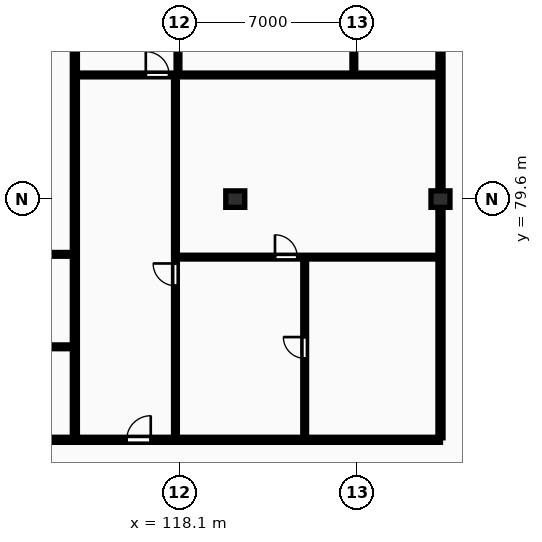
"""IFC4 building model, lengths in metres.
Left out: names, types, materials, properties, quantities, classifications, styles, units other than length and angle.
Written with IfcOpenShell. Run it as: python <this file> out.ifc"""

import sys

from ifc_helpers import new_model, si_unit, direction, frame, frame_2d, origin, origin_2d, place, context, subcontext, project, spatial, rectangle, extrude, element, fill, save


model = new_model("IFC4")
c1 = context("Model", 3, precision=1e-05, world=origin(), true_north=direction((0.0, 1.0)))
c2 = subcontext(c1, "Body", "Model", "MODEL_VIEW")
j1 = project(units=[si_unit("LENGTHUNIT", "METRE"), si_unit("PLANEANGLEUNIT", "RADIAN")], contexts=[c1])
p1 = place(None, origin())
s1 = spatial("IfcSite", under=j1, at=p1, CompositionType="ELEMENT")
p2 = place(p1, origin())
s2 = spatial("IfcBuilding", under=s1, at=p2, CompositionType="ELEMENT")
p3 = place(p2, frame((0.0, 0.0, 242.45)))
s3 = spatial("IfcBuildingStorey", under=s2, at=p3, CompositionType="ELEMENT", Elevation=242.45)
for number, where, z_axis, x_axis in (
    (1, (120.3, 79.6, 0.0), (0.0, 0.0, 1.0), (1.0, 0.0, 0.0)),
    (2, (128.4, 79.6, 0.0), (0.0, 0.0, 1.0), (1.0, 0.0, 0.0)),
):
    element("IfcColumn", number, at=place(p3, frame(where, z_axis=z_axis, x_axis=x_axis)), inside=s3, PredefinedType="COLUMN", context=c2, shape_type="SweptSolid", body=[
        extrude(rectangle(XDim=0.75, YDim=0.65, at=origin_2d()), origin(), (0.0, 0.0, 1.0), 3.45),
    ])
p4 = place(p3, frame((128.4, 70.18, 0.0), z_axis=(0.0, 0.0, 1.0), x_axis=(0.0, 1.0, 0.0)))
e3 = element("IfcWall", 3, at=p4, inside=s3, PredefinedType="PARTITIONING", context=c2, shape_type="SweptSolid", body=[
    extrude(rectangle(XDim=24.32, YDim=0.2, at=frame_2d((12.16, 0.0))), origin(), (0.0, 0.0, 1.0), 2.477),
])
p5 = place(p3, frame((113.969, 70.18, 0.0), z_axis=(0.0, 0.0, 1.0), x_axis=(0.0, 1.0, 0.0)))
e4 = element("IfcWall", 4, at=p5, inside=s3, PredefinedType="PARTITIONING", context=c2, shape_type="SweptSolid", body=[
    extrude(rectangle(XDim=24.32, YDim=0.2, at=frame_2d((12.16, 0.0))), origin(), (0.0, 0.0, 1.0), 3.17),
])
for number, where, z_axis, x_axis in (
    (5, (110.529, 73.77, 0.0), (0.0, 0.0, 1.0), (1.0, 0.0, 0.0)),
    (6, (110.529, 77.42, 0.0), (0.0, 0.0, 1.0), (1.0, 0.0, 0.0)),
):
    element("IfcWall", number, at=place(p3, frame(where, z_axis=z_axis, x_axis=x_axis)), inside=s3, PredefinedType="PARTITIONING", context=c2, shape_type="SweptSolid", body=[
        extrude(rectangle(XDim=3.36, YDim=0.15, at=frame_2d((1.68, 0.0))), origin(), (0.0, 0.0, 1.0), 3.17),
    ])
p6 = place(p3, frame((123.039, 70.16, 0.0), z_axis=(0.0, 0.0, 1.0), x_axis=(0.0, 1.0, 0.0)))
e7 = element("IfcWall", 7, at=p6, inside=s3, PredefinedType="PARTITIONING", context=c2, shape_type="SweptSolid", body=[
    extrude(rectangle(XDim=7.15, YDim=0.15, at=frame_2d((3.575, 0.0))), origin(), (0.0, 0.0, 1.0), 3.17),
])
p7 = place(p6, frame((3.155, 0.0, 0.0)))
e8 = element("IfcOpeningElement", 8, at=p7, cuts=e7, PredefinedType="OPENING", context=c2, shape_type="SweptSolid", body=[
    extrude(rectangle(XDim=0.84, YDim=2.04, at=frame_2d((0.42, 1.02))), frame((0.0, 0.085, 0.0), z_axis=(0.0, -1.0, 0.0), x_axis=(1.0, 0.0, 0.0)), (0.0, 0.0, 1.0), 0.17),
])
p8 = place(p3, frame((117.999, 77.31, 0.0), z_axis=(0.0, 0.0, 1.0), x_axis=(1.0, 0.0, 0.0)))
e9 = element("IfcWall", 9, at=p8, inside=s3, PredefinedType="PARTITIONING", context=c2, shape_type="SweptSolid", body=[
    extrude(rectangle(XDim=10.321, YDim=0.15, at=frame_2d((5.161, 0.0))), origin(), (0.0, 0.0, 1.0), 3.17),
])
p9 = place(p8, frame((3.869, 0.0, 0.0)))
e10 = element("IfcOpeningElement", 10, at=p9, cuts=e9, PredefinedType="OPENING", context=c2, shape_type="SweptSolid", body=[
    extrude(rectangle(XDim=0.88, YDim=2.06, at=frame_2d((0.44, 1.03))), frame((0.0, 0.085, 0.0), z_axis=(0.0, -1.0, 0.0), x_axis=(1.0, 0.0, 0.0)), (0.0, 0.0, 1.0), 0.17),
])
p10 = place(p3, frame((117.939, 70.16, 0.0), z_axis=(0.0, 0.0, 1.0), x_axis=(0.0, 1.0, 0.0)))
e11 = element("IfcWall", 11, at=p10, inside=s3, PredefinedType="PARTITIONING", context=c2, shape_type="SweptSolid", body=[
    extrude(rectangle(XDim=14.3, YDim=0.15, at=frame_2d((7.15, 0.0))), origin(), (0.0, 0.0, 1.0), 3.17),
])
p11 = place(p10, frame((6.02, 0.0, 0.0)))
e12 = element("IfcOpeningElement", 12, at=p11, cuts=e11, PredefinedType="OPENING", context=c2, shape_type="SweptSolid", body=[
    extrude(rectangle(XDim=0.88, YDim=2.06, at=frame_2d((0.44, 1.03))), frame((0.0, 0.085, 0.0), z_axis=(0.0, -1.0, 0.0), x_axis=(1.0, 0.0, 0.0)), (0.0, 0.0, 1.0), 0.17),
])
p12 = place(p3, frame((118.039, 84.54, 0.0), z_axis=(0.0, 0.0, 1.0), x_axis=(0.0, 1.0, 0.0)))
e13 = element("IfcWall", 13, at=p12, inside=s3, PredefinedType="PARTITIONING", context=c2, shape_type="SweptSolid", body=[
    extrude(rectangle(XDim=5.0, YDim=0.15, at=frame_2d((2.5, 0.0))), origin(), (0.0, 0.0, 1.0), 3.17),
])
p13 = place(p12, frame((2.06, 0.0, 0.0)))
e14 = element("IfcOpeningElement", 14, at=p13, cuts=e13, PredefinedType="OPENING", context=c2, shape_type="SweptSolid", body=[
    extrude(rectangle(XDim=0.88, YDim=2.06, at=frame_2d((0.44, 1.03))), frame((0.0, 0.085, 0.0), z_axis=(0.0, -1.0, 0.0), x_axis=(1.0, 0.0, 0.0)), (0.0, 0.0, 1.0), 0.17),
])
p14 = place(p3, frame((124.98, 84.54, 0.0), z_axis=(0.0, 0.0, 1.0), x_axis=(0.0, 1.0, 0.0)))
e15 = element("IfcWall", 15, at=p14, inside=s3, PredefinedType="PARTITIONING", context=c2, shape_type="SweptSolid", body=[
    extrude(rectangle(XDim=9.96, YDim=0.15, at=frame_2d((4.98, 0.0))), origin(), (0.0, 0.0, 1.0), 3.17),
])
p15 = place(p14, frame((1.43, 0.0, 0.0)))
e16 = element("IfcOpeningElement", 16, at=p15, cuts=e15, PredefinedType="OPENING", context=c2, shape_type="SweptSolid", body=[
    extrude(rectangle(XDim=0.84, YDim=2.04, at=frame_2d((0.42, 1.02))), frame((0.0, 0.085, 0.0), z_axis=(0.0, -1.0, 0.0), x_axis=(1.0, 0.0, 0.0)), (0.0, 0.0, 1.0), 0.17),
])
p16 = place(p14, frame((3.92, 0.0, 0.0)))
e17 = element("IfcOpeningElement", 17, at=p16, cuts=e15, PredefinedType="OPENING", context=c2, shape_type="SweptSolid", body=[
    extrude(rectangle(XDim=0.84, YDim=2.04, at=frame_2d((0.42, 1.02))), frame((0.0, 0.085, 0.0), z_axis=(0.0, -1.0, 0.0), x_axis=(1.0, 0.0, 0.0)), (0.0, 0.0, 1.0), 0.17),
])
p17 = place(p14, frame((5.48, 0.0, 0.0)))
e18 = element("IfcOpeningElement", 18, at=p17, cuts=e15, PredefinedType="OPENING", context=c2, shape_type="SweptSolid", body=[
    extrude(rectangle(XDim=0.88, YDim=2.06, at=frame_2d((0.44, 1.03))), frame((0.0, 0.085, 0.0), z_axis=(0.0, -1.0, 0.0), x_axis=(1.0, 0.0, 0.0)), (0.0, 0.0, 1.0), 0.17),
])
p18 = place(p3, frame((114.049, 84.5, 0.0), z_axis=(0.0, 0.0, 1.0), x_axis=(1.0, 0.0, 0.0)))
e19 = element("IfcWall", 19, at=p18, inside=s3, PredefinedType="PARTITIONING", context=c2, shape_type="SweptSolid", body=[
    extrude(rectangle(XDim=14.271, YDim=0.15, at=frame_2d((7.136, 0.0))), origin(), (0.0, 0.0, 1.0), 3.17),
])
p19 = place(p18, frame((2.72, 0.0, 0.0)))
e20 = element("IfcOpeningElement", 20, at=p19, cuts=e19, PredefinedType="OPENING", context=c2, shape_type="SweptSolid", body=[
    extrude(rectangle(XDim=0.92, YDim=2.08, at=frame_2d((0.46, 1.04))), frame((0.0, 0.085, 0.0), z_axis=(0.0, -1.0, 0.0), x_axis=(1.0, 0.0, 0.0)), (0.0, 0.0, 1.0), 0.17),
])
p20 = place(p3, frame((59.8, 70.1, 0.0), z_axis=(0.0, 0.0, 1.0), x_axis=(1.0, 0.0, 0.0)))
e21 = element("IfcWall", 21, at=p20, inside=s3, PredefinedType="PARTITIONING", context=c2, shape_type="SweptSolid", body=[
    extrude(rectangle(XDim=68.6, YDim=0.2, at=frame_2d((34.3, 0.0))), origin(), (0.0, 0.0, 1.0), 3.17),
])
p21 = place(p20, frame((2.045, 0.0, 0.0)))
e22 = element("IfcOpeningElement", 22, at=p21, cuts=e21, PredefinedType="OPENING", context=c2, shape_type="SweptSolid", body=[
    extrude(rectangle(XDim=0.95, YDim=2.15, at=frame_2d((0.475, 1.075))), frame((0.0, 0.11, 0.0), z_axis=(0.0, -1.0, 0.0), x_axis=(1.0, 0.0, 0.0)), (0.0, 0.0, 1.0), 0.22),
])
p22 = place(p20, frame((24.57, 0.0, 0.0)))
e23 = element("IfcOpeningElement", 23, at=p22, cuts=e21, PredefinedType="OPENING", context=c2, shape_type="SweptSolid", body=[
    extrude(rectangle(XDim=1.22, YDim=2.18, at=frame_2d((0.61, 1.09))), frame((0.0, 0.11, 0.0), z_axis=(0.0, -1.0, 0.0), x_axis=(1.0, 0.0, 0.0)), (0.0, 0.0, 1.0), 0.22),
])
p23 = place(p20, frame((43.507, 0.0, 0.0)))
e24 = element("IfcOpeningElement", 24, at=p23, cuts=e21, PredefinedType="OPENING", context=c2, shape_type="SweptSolid", body=[
    extrude(rectangle(XDim=1.22, YDim=2.18, at=frame_2d((0.61, 1.09))), frame((0.0, 0.11, 0.0), z_axis=(0.0, -1.0, 0.0), x_axis=(1.0, 0.0, 0.0)), (0.0, 0.0, 1.0), 0.22),
])
p24 = place(p20, frame((56.214, 0.0, 0.0)))
e25 = element("IfcOpeningElement", 25, at=p24, cuts=e21, PredefinedType="OPENING", context=c2, shape_type="SweptSolid", body=[
    extrude(rectangle(XDim=0.95, YDim=2.15, at=frame_2d((0.475, 1.075))), frame((0.0, 0.11, 0.0), z_axis=(0.0, -1.0, 0.0), x_axis=(1.0, 0.0, 0.0)), (0.0, 0.0, 1.0), 0.22),
])
p25 = place(p7, origin())
e26 = element("IfcDoor", 26, at=p25, inside=s3, OperationType="SINGLE_SWING_RIGHT", PredefinedType="DOOR", context=c2, shape_type="SweptSolid", body=[
    extrude(rectangle(XDim=0.84, YDim=2.04, at=frame_2d((0.42, 1.02))), frame((0.0, 0.025, 0.0), z_axis=(0.0, -1.0, 0.0), x_axis=(1.0, 0.0, 0.0)), (0.0, 0.0, 1.0), 0.05),
])
fill(e8, e26)
p26 = place(p9, origin())
e27 = element("IfcDoor", 27, at=p26, inside=s3, OperationType="SINGLE_SWING_LEFT", PredefinedType="DOOR", context=c2, shape_type="SweptSolid", body=[
    extrude(rectangle(XDim=0.88, YDim=2.06, at=frame_2d((0.44, 1.03))), frame((0.0, 0.025, 0.0), z_axis=(0.0, -1.0, 0.0), x_axis=(1.0, 0.0, 0.0)), (0.0, 0.0, 1.0), 0.05),
])
fill(e10, e27)
p27 = place(p11, origin())
e28 = element("IfcDoor", 28, at=p27, inside=s3, OperationType="SINGLE_SWING_RIGHT", PredefinedType="DOOR", context=c2, shape_type="SweptSolid", body=[
    extrude(rectangle(XDim=0.88, YDim=2.06, at=frame_2d((0.44, 1.03))), frame((0.0, 0.025, 0.0), z_axis=(0.0, -1.0, 0.0), x_axis=(1.0, 0.0, 0.0)), (0.0, 0.0, 1.0), 0.05),
])
fill(e12, e28)
p28 = place(p19, origin())
e29 = element("IfcDoor", 29, at=p28, inside=s3, OperationType="SINGLE_SWING_LEFT", PredefinedType="DOOR", context=c2, shape_type="SweptSolid", body=[
    extrude(rectangle(XDim=0.92, YDim=2.08, at=frame_2d((0.46, 1.04))), frame((0.0, 0.025, 0.0), z_axis=(0.0, -1.0, 0.0), x_axis=(1.0, 0.0, 0.0)), (0.0, 0.0, 1.0), 0.05),
])
fill(e20, e29)
p29 = place(p24, origin())
e30 = element("IfcDoor", 30, at=p29, inside=s3, OperationType="SINGLE_SWING_RIGHT", PredefinedType="DOOR", context=c2, shape_type="SweptSolid", body=[
    extrude(rectangle(XDim=0.95, YDim=2.15, at=frame_2d((0.475, 1.075))), frame((0.0, 0.025, 0.0), z_axis=(0.0, -1.0, 0.0), x_axis=(1.0, 0.0, 0.0)), (0.0, 0.0, 1.0), 0.05),
])
fill(e25, e30)
save(model, sys.argv[1])
